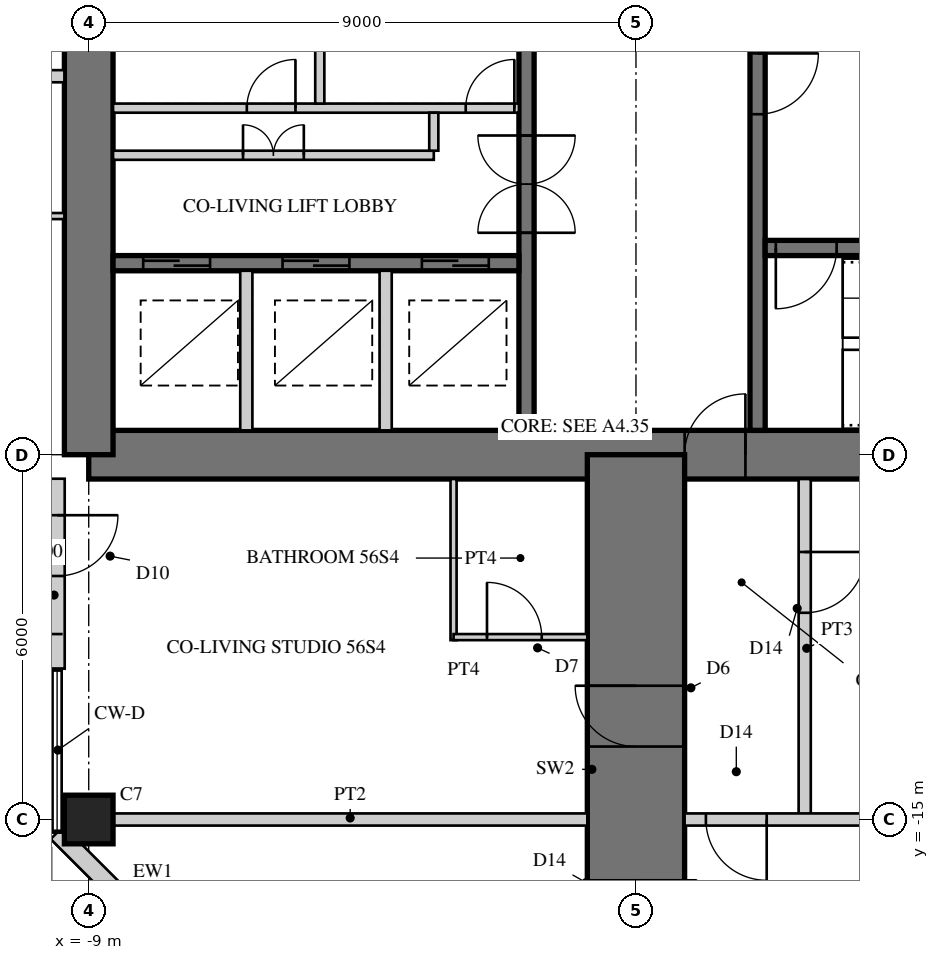
"""IFC4 building model, lengths in metres.
Left out: names, types, materials, properties, quantities, classifications, styles, units other than length and angle.
Written with IfcOpenShell. Run it as: python <this file> out.ifc"""

import sys

from ifc_helpers import new_model, si_unit, direction, frame, frame_2d, origin, origin_2d, place, context, subcontext, project, spatial, rectangle, hollow_rectangle, extrude, element, fill, save


model = new_model("IFC4")
c1 = context("Model", 3, precision=1e-05, world=origin(), true_north=direction((0.0, 1.0)))
c2 = subcontext(c1, "Body", "Model", "MODEL_VIEW")
j1 = project(units=[si_unit("LENGTHUNIT", "METRE"), si_unit("PLANEANGLEUNIT", "RADIAN")], contexts=[c1])
p1 = place(None, origin())
s1 = spatial("IfcSite", under=j1, at=p1, CompositionType="ELEMENT")
p2 = place(p1, origin())
s2 = spatial("IfcBuilding", under=s1, at=p2, CompositionType="ELEMENT")
p3 = place(p2, frame((0.0, 0.0, 222.1)))
s3 = spatial("IfcBuildingStorey", under=s2, at=p3, CompositionType="ELEMENT", Elevation=222.1)
p4 = place(p3, frame((-9.0, -9.0, 0.0), z_axis=(0.0, 0.0, 1.0), x_axis=(1.0, 0.0, 0.0)))
e1 = element("IfcWall", 1, at=p4, inside=s3, PredefinedType="SHEAR", context=c2, shape_type="SweptSolid", body=[
    extrude(rectangle(XDim=18.0, YDim=0.8, at=frame_2d((9.0, 0.0))), origin(), (0.0, 0.0, 1.0), 3.4),
])
p5 = place(p4, frame((9.8, 0.0, 0.0)))
e2 = element("IfcOpeningElement", 2, at=p5, cuts=e1, PredefinedType="OPENING", context=c2, shape_type="SweptSolid", body=[
    extrude(rectangle(XDim=1.0, YDim=2.4, at=frame_2d((0.5, 1.2))), frame((0.0, 0.41, 0.0), z_axis=(0.0, -1.0, 0.0), x_axis=(1.0, 0.0, 0.0)), (0.0, 0.0, 1.0), 0.82),
])
p6 = place(p3, frame((-9.0, 9.0, 0.0), z_axis=(0.0, 0.0, 1.0), x_axis=(0.0, -1.0, 0.0)))
e3 = element("IfcWall", 3, at=p6, inside=s3, PredefinedType="SHEAR", context=c2, shape_type="SweptSolid", body=[
    extrude(rectangle(XDim=18.0, YDim=0.8, at=frame_2d((9.0, 0.0))), origin(), (0.0, 0.0, 1.0), 3.4),
])
p7 = place(p6, frame((9.8, 0.0, 0.0)))
e4 = element("IfcOpeningElement", 4, at=p7, cuts=e3, PredefinedType="OPENING", context=c2, shape_type="SweptSolid", body=[
    extrude(rectangle(XDim=1.0, YDim=2.4, at=frame_2d((0.5, 1.2))), frame((0.0, 0.41, 0.0), z_axis=(0.0, -1.0, 0.0), x_axis=(1.0, 0.0, 0.0)), (0.0, 0.0, 1.0), 0.82),
])
p8 = place(p3, frame((-1.8, -1.875, 0.0), z_axis=(0.0, 0.0, 1.0), x_axis=(0.0, -1.0, 0.0)))
e5 = element("IfcWall", 5, at=p8, inside=s3, PredefinedType="SHEAR", context=c2, shape_type="SweptSolid", body=[
    extrude(rectangle(XDim=6.725, YDim=0.25, at=frame_2d((3.363, 0.0))), origin(), (0.0, 0.0, 1.0), 3.4),
])
p9 = place(p8, frame((1.875, 0.0, 0.0)))
e6 = element("IfcOpeningElement", 6, at=p9, cuts=e5, PredefinedType="OPENING", context=c2, shape_type="SweptSolid", body=[
    extrude(rectangle(XDim=1.6, YDim=2.4, at=frame_2d((0.8, 1.2))), frame((0.0, 0.135, 0.0), z_axis=(0.0, -1.0, 0.0), x_axis=(1.0, 0.0, 0.0)), (0.0, 0.0, 1.0), 0.27),
])
p10 = place(p3, frame((-1.925, -5.85, 0.0), z_axis=(0.0, 0.0, 1.0), x_axis=(-1.0, 0.0, 0.0)))
e7 = element("IfcWall", 7, at=p10, inside=s3, PredefinedType="SHEAR", context=c2, shape_type="SweptSolid", body=[
    extrude(rectangle(XDim=6.675, YDim=0.25, at=frame_2d((3.337, 0.0))), origin(), (0.0, 0.0, 1.0), 3.4),
])
p11 = place(p10, frame((0.496, 0.0, 0.0)))
e8 = element("IfcOpeningElement", 8, at=p11, cuts=e7, PredefinedType="OPENING", context=c2, shape_type="SweptSolid", body=[
    extrude(rectangle(XDim=1.1, YDim=2.2, at=frame_2d((0.55, 1.1))), frame((0.0, 0.135, 0.0), z_axis=(0.0, -1.0, 0.0), x_axis=(1.0, 0.0, 0.0)), (0.0, 0.0, 1.0), 0.27),
])
p12 = place(p10, frame((2.788, 0.0, 0.0)))
e9 = element("IfcOpeningElement", 9, at=p12, cuts=e7, PredefinedType="OPENING", context=c2, shape_type="SweptSolid", body=[
    extrude(rectangle(XDim=1.1, YDim=2.2, at=frame_2d((0.55, 1.1))), frame((0.0, 0.135, 0.0), z_axis=(0.0, -1.0, 0.0), x_axis=(1.0, 0.0, 0.0)), (0.0, 0.0, 1.0), 0.27),
])
p13 = place(p10, frame((5.079, 0.0, 0.0)))
e10 = element("IfcOpeningElement", 10, at=p13, cuts=e7, PredefinedType="OPENING", context=c2, shape_type="SweptSolid", body=[
    extrude(rectangle(XDim=1.1, YDim=2.2, at=frame_2d((0.55, 1.1))), frame((0.0, 0.135, 0.0), z_axis=(0.0, -1.0, 0.0), x_axis=(1.0, 0.0, 0.0)), (0.0, 0.0, 1.0), 0.27),
])
p14 = place(p3, frame((-1.925, -3.3, 0.0), z_axis=(0.0, 0.0, 1.0), x_axis=(-1.0, 0.0, 0.0)))
e11 = element("IfcWall", 11, at=p14, inside=s3, PredefinedType="PARTITIONING", context=c2, shape_type="SweptSolid", body=[
    extrude(rectangle(XDim=6.675, YDim=0.15, at=frame_2d((3.337, 0.0))), origin(), (0.0, 0.0, 1.0), 3.4),
])
p15 = place(p14, frame((0.075, 0.0, 0.0)))
e12 = element("IfcOpeningElement", 12, at=p15, cuts=e11, PredefinedType="OPENING", context=c2, shape_type="SweptSolid", body=[
    extrude(rectangle(XDim=0.8, YDim=2.1, at=frame_2d((0.4, 1.05))), frame((0.0, 0.085, 0.0), z_axis=(0.0, -1.0, 0.0), x_axis=(1.0, 0.0, 0.0)), (0.0, 0.0, 1.0), 0.17),
])
p16 = place(p14, frame((3.675, 0.0, 0.0)))
e13 = element("IfcOpeningElement", 13, at=p16, cuts=e11, PredefinedType="OPENING", context=c2, shape_type="SweptSolid", body=[
    extrude(rectangle(XDim=0.8, YDim=2.1, at=frame_2d((0.4, 1.05))), frame((0.0, 0.085, 0.0), z_axis=(0.0, -1.0, 0.0), x_axis=(1.0, 0.0, 0.0)), (0.0, 0.0, 1.0), 0.17),
])
p17 = place(p3, frame((-5.2, -2.125, 0.0), z_axis=(0.0, 0.0, 1.0), x_axis=(0.0, -1.0, 0.0)))
e14 = element("IfcWall", 14, at=p17, inside=s3, PredefinedType="PARTITIONING", context=c2, shape_type="SweptSolid", body=[
    extrude(rectangle(XDim=1.1, YDim=0.15, at=frame_2d((0.55, 0.0))), origin(), (0.0, 0.0, 1.0), 3.4),
])
for number, where, z_axis, x_axis in (
    (15, (-4.117, -5.975, 0.0), (0.0, 0.0, 1.0), (0.0, -1.0, 0.0)),
    (16, (-6.408, -5.975, 0.0), (0.0, 0.0, 1.0), (0.0, -1.0, 0.0)),
):
    element("IfcWall", number, at=place(p3, frame(where, z_axis=z_axis, x_axis=x_axis)), inside=s3, PredefinedType="PARTITIONING", context=c2, shape_type="SweptSolid", body=[
        extrude(rectangle(XDim=2.625, YDim=0.2, at=frame_2d((1.312, 0.0))), origin(), (0.0, 0.0, 1.0), 3.4),
    ])
p18 = place(p3, frame((2.0, -1.675, 0.0), z_axis=(0.0, 0.0, 1.0), x_axis=(0.0, -1.0, 0.0)))
e17 = element("IfcWall", 17, at=p18, inside=s3, PredefinedType="SHEAR", context=c2, shape_type="SweptSolid", body=[
    extrude(rectangle(XDim=6.925, YDim=0.25, at=frame_2d((3.462, 0.0))), origin(), (0.0, 0.0, 1.0), 3.4),
])
p19 = place(p18, frame((0.725, 0.0, 0.0)))
e18 = element("IfcOpeningElement", 18, at=p19, cuts=e17, PredefinedType="OPENING", context=c2, shape_type="SweptSolid", body=[
    extrude(rectangle(XDim=1.0, YDim=2.1, at=frame_2d((0.5, 1.05))), frame((0.0, 0.135, 0.0), z_axis=(0.0, -1.0, 0.0), x_axis=(1.0, 0.0, 0.0)), (0.0, 0.0, 1.0), 0.27),
])
p20 = place(p3, frame((2.125, -5.6, 0.0), z_axis=(0.0, 0.0, 1.0), x_axis=(1.0, 0.0, 0.0)))
e19 = element("IfcWall", 19, at=p20, inside=s3, PredefinedType="SHEAR", context=c2, shape_type="SweptSolid", body=[
    extrude(rectangle(XDim=6.475, YDim=0.25, at=frame_2d((3.238, 0.0))), origin(), (0.0, 0.0, 1.0), 3.4),
])
p21 = place(p20, frame((0.175, 0.0, 0.0)))
e20 = element("IfcOpeningElement", 20, at=p21, cuts=e19, PredefinedType="OPENING", context=c2, shape_type="SweptSolid", body=[
    extrude(rectangle(XDim=1.0, YDim=2.1, at=frame_2d((0.5, 1.05))), frame((0.0, 0.135, 0.0), z_axis=(0.0, -1.0, 0.0), x_axis=(1.0, 0.0, 0.0)), (0.0, 0.0, 1.0), 0.27),
])
p22 = place(p3, frame((0.0, -9.0, 0.0), z_axis=(0.0, 0.0, 1.0), x_axis=(0.0, -1.0, 0.0)))
e21 = element("IfcWall", 21, at=p22, inside=s3, PredefinedType="SHEAR", context=c2, shape_type="SweptSolid", body=[
    extrude(rectangle(XDim=9.0, YDim=1.6, at=frame_2d((4.5, 0.0))), origin(), (0.0, 0.0, 1.0), 3.4),
])
p23 = place(p22, frame((3.8, 0.0, 0.0)))
e22 = element("IfcOpeningElement", 22, at=p23, cuts=e21, PredefinedType="OPENING", context=c2, shape_type="SweptSolid", body=[
    extrude(rectangle(XDim=1.0, YDim=2.15, at=frame_2d((0.5, 1.075))), frame((0.0, 0.81, 0.0), z_axis=(0.0, -1.0, 0.0), x_axis=(1.0, 0.0, 0.0)), (0.0, 0.0, 1.0), 1.62),
])
p24 = place(p22, frame((7.0, 0.0, 0.0)))
e23 = element("IfcOpeningElement", 23, at=p24, cuts=e21, PredefinedType="OPENING", context=c2, shape_type="SweptSolid", body=[
    extrude(rectangle(XDim=1.0, YDim=2.2, at=frame_2d((0.5, 1.1))), frame((0.0, 0.81, 0.0), z_axis=(0.0, -1.0, 0.0), x_axis=(1.0, 0.0, 0.0)), (0.0, 0.0, 1.0), 1.62),
])
p25 = place(p3, frame((-9.0, -15.0, 0.0), z_axis=(0.0, 0.0, 1.0), x_axis=(1.0, 0.0, 0.0)))
e24 = element("IfcColumn", 24, at=p25, inside=s3, PredefinedType="COLUMN", context=c2, shape_type="SweptSolid", body=[
    extrude(rectangle(XDim=0.8, YDim=0.8, at=origin_2d()), origin(), (0.0, 0.0, 1.0), 3.4),
])
p26 = place(p3, frame((-9.52, -9.395, 0.0), z_axis=(0.0, 0.0, 1.0), x_axis=(0.0, -1.0, 0.0)))
e25 = element("IfcWall", 25, at=p26, inside=s3, PredefinedType="SOLIDWALL", context=c2, shape_type="SweptSolid", body=[
    extrude(rectangle(XDim=3.125, YDim=0.25, at=frame_2d((1.562, 0.0))), origin(), (0.0, 0.0, 1.0), 3.22),
])
p27 = place(p26, frame((0.6, 0.0, 0.0)))
e26 = element("IfcOpeningElement", 26, at=p27, cuts=e25, PredefinedType="OPENING", context=c2, shape_type="SweptSolid", body=[
    extrude(rectangle(XDim=1.0, YDim=2.2, at=frame_2d((0.5, 1.1))), frame((0.0, 0.135, 0.0), z_axis=(0.0, -1.0, 0.0), x_axis=(1.0, 0.0, 0.0)), (0.0, 0.0, 1.0), 0.27),
])
p28 = place(p3, frame((-9.52, -15.215, 0.0), z_axis=(0.0, 0.0, 1.0), x_axis=(0.707106781187, -0.707106781187, 0.0)))
e27 = element("IfcWall", 27, at=p28, inside=s3, PredefinedType="SOLIDWALL", context=c2, shape_type="SweptSolid", body=[
    extrude(rectangle(XDim=4.674, YDim=0.3, at=frame_2d((2.337, 0.0))), origin(), (0.0, 0.0, 1.0), 3.22),
])
p29 = place(p28, frame((2.15, 0.0, 0.0)))
e28 = element("IfcOpeningElement", 28, at=p29, cuts=e27, PredefinedType="OPENING", context=c2, shape_type="SweptSolid", body=[
    extrude(rectangle(XDim=1.0, YDim=2.4, at=frame_2d((0.5, 1.2))), frame((0.0, 0.16, 0.0), z_axis=(0.0, -1.0, 0.0), x_axis=(1.0, 0.0, 0.0)), (0.0, 0.0, 1.0), 0.32),
])
p30 = place(p3, frame((-3.325, -4.075, 0.0), z_axis=(0.0, 0.0, 1.0), x_axis=(-1.0, 0.0, 0.0)))
e29 = element("IfcWall", 29, at=p30, inside=s3, PredefinedType="PARTITIONING", context=c2, shape_type="SweptSolid", body=[
    extrude(rectangle(XDim=5.275, YDim=0.15, at=frame_2d((2.638, 0.0))), origin(), (0.0, 0.0, 1.0), 3.22),
])
p31 = place(p30, frame((2.137, 0.0, 0.0)))
e30 = element("IfcOpeningElement", 30, at=p31, cuts=e29, PredefinedType="OPENING", context=c2, shape_type="SweptSolid", body=[
    extrude(rectangle(XDim=1.0, YDim=2.1, at=frame_2d((0.5, 1.05))), frame((0.0, 0.085, 0.0), z_axis=(0.0, -1.0, 0.0), x_axis=(1.0, 0.0, 0.0)), (0.0, 0.0, 1.0), 0.17),
])
p32 = place(p3, frame((-3.325, -3.375, 0.0), z_axis=(0.0, 0.0, 1.0), x_axis=(0.0, -1.0, 0.0)))
e31 = element("IfcWall", 31, at=p32, inside=s3, PredefinedType="PARTITIONING", context=c2, shape_type="SweptSolid", body=[
    extrude(rectangle(XDim=0.625, YDim=0.15, at=frame_2d((0.312, 0.0))), origin(), (0.0, 0.0, 1.0), 3.22),
])
p33 = place(p3, frame((-3.0, -9.4, 0.0), z_axis=(0.0, 0.0, 1.0), x_axis=(0.0, -1.0, 0.0)))
e32 = element("IfcWall", 32, at=p33, inside=s3, PredefinedType="PARTITIONING", context=c2, shape_type="SweptSolid", body=[
    extrude(rectangle(XDim=2.65, YDim=0.1, at=frame_2d((1.325, 0.0))), origin(), (0.0, 0.0, 1.0), 3.22),
])
p34 = place(p3, frame((-3.0, -12.0, 0.0), z_axis=(0.0, 0.0, 1.0), x_axis=(1.0, 0.0, 0.0)))
e33 = element("IfcWall", 33, at=p34, inside=s3, PredefinedType="PARTITIONING", context=c2, shape_type="SweptSolid", body=[
    extrude(rectangle(XDim=2.2, YDim=0.1, at=frame_2d((1.1, 0.0))), origin(), (0.0, 0.0, 1.0), 3.22),
])
p35 = place(p34, frame((0.55, 0.0, 0.0)))
e34 = element("IfcOpeningElement", 34, at=p35, cuts=e33, PredefinedType="OPENING", context=c2, shape_type="SweptSolid", body=[
    extrude(rectangle(XDim=0.9, YDim=2.1, at=frame_2d((0.45, 1.05))), frame((0.0, 0.06, 0.0), z_axis=(0.0, -1.0, 0.0), x_axis=(1.0, 0.0, 0.0)), (0.0, 0.0, 1.0), 0.12),
])
p36 = place(p3, frame((2.775, -9.4, 0.0), z_axis=(0.0, 0.0, 1.0), x_axis=(0.0, -1.0, 0.0)))
e35 = element("IfcWall", 35, at=p36, inside=s3, PredefinedType="SOLIDWALL", context=c2, shape_type="SweptSolid", body=[
    extrude(rectangle(XDim=5.6, YDim=0.2, at=frame_2d((2.8, 0.0))), origin(), (0.0, 0.0, 1.0), 3.22),
])
p37 = place(p36, frame((1.2, 0.0, 0.0)))
e36 = element("IfcOpeningElement", 36, at=p37, cuts=e35, PredefinedType="OPENING", context=c2, shape_type="SweptSolid", body=[
    extrude(rectangle(XDim=1.0, YDim=2.2, at=frame_2d((0.5, 1.1))), frame((0.0, 0.11, 0.0), z_axis=(0.0, -1.0, 0.0), x_axis=(1.0, 0.0, 0.0)), (0.0, 0.0, 1.0), 0.22),
])
p38 = place(p3, frame((-8.6, -15.0, 0.0), z_axis=(0.0, 0.0, 1.0), x_axis=(1.0, 0.0, 0.0)))
e37 = element("IfcWall", 37, at=p38, inside=s3, PredefinedType="SOLIDWALL", context=c2, shape_type="SweptSolid", body=[
    extrude(rectangle(XDim=7.8, YDim=0.2, at=frame_2d((3.9, 0.0))), origin(), (0.0, 0.0, 1.0), 2.52),
])
p39 = place(p3, frame((0.8, -15.0, 0.0), z_axis=(0.0, 0.0, 1.0), x_axis=(1.0, 0.0, 0.0)))
e38 = element("IfcWall", 38, at=p39, inside=s3, PredefinedType="SOLIDWALL", context=c2, shape_type="SweptSolid", body=[
    extrude(rectangle(XDim=7.8, YDim=0.2, at=frame_2d((3.9, 0.0))), origin(), (0.0, 0.0, 1.0), 2.52),
])
p40 = place(p39, frame((0.35, 0.0, 0.0)))
e39 = element("IfcOpeningElement", 39, at=p40, cuts=e38, PredefinedType="OPENING", context=c2, shape_type="SweptSolid", body=[
    extrude(rectangle(XDim=1.0, YDim=2.2, at=frame_2d((0.5, 1.1))), frame((0.0, 0.11, 0.0), z_axis=(0.0, -1.0, 0.0), x_axis=(1.0, 0.0, 0.0)), (0.0, 0.0, 1.0), 0.22),
])
p41 = place(p3, frame((-9.4, -5.075, 0.0), z_axis=(0.0, 0.0, 1.0), x_axis=(-1.0, 0.0, 0.0)))
e40 = element("IfcWall", 40, at=p41, inside=s3, PredefinedType="PARTITIONING", context=c2, shape_type="SweptSolid", body=[
    extrude(rectangle(XDim=2.65, YDim=0.1, at=frame_2d((1.325, 0.0))), origin(), (0.0, 0.0, 1.0), 3.22),
])
p42 = place(p3, frame((-9.4, -2.775, 0.0), z_axis=(0.0, 0.0, 1.0), x_axis=(-1.0, 0.0, 0.0)))
e41 = element("IfcWall", 41, at=p42, inside=s3, PredefinedType="SOLIDWALL", context=c2, shape_type="SweptSolid", body=[
    extrude(rectangle(XDim=11.6, YDim=0.2, at=frame_2d((5.8, 0.0))), origin(), (0.0, 0.0, 1.0), 3.22),
])
p43 = place(p42, frame((3.4, 0.0, 0.0)))
e42 = element("IfcOpeningElement", 42, at=p43, cuts=e41, PredefinedType="OPENING", context=c2, shape_type="SweptSolid", body=[
    extrude(rectangle(XDim=1.0, YDim=2.15, at=frame_2d((0.5, 1.075))), frame((0.0, 0.11, 0.0), z_axis=(0.0, -1.0, 0.0), x_axis=(1.0, 0.0, 0.0)), (0.0, 0.0, 1.0), 0.22),
])
p44 = place(p42, frame((6.2, 0.0, 0.0)))
e43 = element("IfcOpeningElement", 43, at=p44, cuts=e41, PredefinedType="OPENING", context=c2, shape_type="SweptSolid", body=[
    extrude(rectangle(XDim=1.0, YDim=2.15, at=frame_2d((0.5, 1.075))), frame((0.0, 0.11, 0.0), z_axis=(0.0, -1.0, 0.0), x_axis=(1.0, 0.0, 0.0)), (0.0, 0.0, 1.0), 0.22),
])
p45 = place(p27, origin())
e44 = element("IfcDoor", 44, at=p45, inside=s3, OperationType="SINGLE_SWING_LEFT", PredefinedType="DOOR", context=c2, shape_type="SweptSolid", body=[
    extrude(hollow_rectangle(XDim=1.0, YDim=2.2, WallThickness=0.06, at=frame_2d((0.5, 1.1))), frame((0.0, 0.025, 0.0), z_axis=(0.0, -1.0, 0.0), x_axis=(1.0, 0.0, 0.0)), (0.0, 0.0, 1.0), 0.05),
    extrude(rectangle(XDim=0.879, YDim=2.079, at=frame_2d((0.5, 1.1))), frame((0.0, 0.025, 0.0), z_axis=(0.0, -1.0, 0.0), x_axis=(1.0, 0.0, 0.0)), (0.0, 0.0, 1.0), 0.05),
])
fill(e26, e44)
p46 = place(p31, frame((1.0, 0.0, 0.0), z_axis=(0.0, 0.0, 1.0), x_axis=(-1.0, 0.0, 0.0)))
e45 = element("IfcDoor", 45, at=p46, inside=s3, OperationType="DOUBLE_DOOR_SINGLE_SWING", PredefinedType="DOOR", context=c2, shape_type="SweptSolid", body=[
    extrude(rectangle(XDim=1.0, YDim=2.1, at=frame_2d((0.5, 1.05))), frame((0.0, 0.025, 0.0), z_axis=(0.0, -1.0, 0.0), x_axis=(1.0, 0.0, 0.0)), (0.0, 0.0, 1.0), 0.05),
])
fill(e30, e45)
p47 = place(p35, origin())
e46 = element("IfcDoor", 46, at=p47, inside=s3, OperationType="SINGLE_SWING_LEFT", PredefinedType="DOOR", context=c2, shape_type="SweptSolid", body=[
    extrude(rectangle(XDim=0.9, YDim=2.1, at=frame_2d((0.45, 1.05))), frame((0.0, 0.025, 0.0), z_axis=(0.0, -1.0, 0.0), x_axis=(1.0, 0.0, 0.0)), (0.0, 0.0, 1.0), 0.05),
])
fill(e34, e46)
p48 = place(p37, origin())
e47 = element("IfcDoor", 47, at=p48, inside=s3, OperationType="SINGLE_SWING_LEFT", PredefinedType="DOOR", context=c2, shape_type="SweptSolid", body=[
    extrude(rectangle(XDim=1.0, YDim=2.2, at=frame_2d((0.5, 1.1))), frame((0.0, 0.025, 0.0), z_axis=(0.0, -1.0, 0.0), x_axis=(1.0, 0.0, 0.0)), (0.0, 0.0, 1.0), 0.05),
])
fill(e36, e47)
p49 = place(p40, frame((1.0, 0.0, 0.0), z_axis=(0.0, 0.0, 1.0), x_axis=(-1.0, 0.0, 0.0)))
e48 = element("IfcDoor", 48, at=p49, inside=s3, OperationType="SINGLE_SWING_LEFT", PredefinedType="DOOR", context=c2, shape_type="SweptSolid", body=[
    extrude(rectangle(XDim=1.0, YDim=2.2, at=frame_2d((0.5, 1.1))), frame((0.0, 0.025, 0.0), z_axis=(0.0, -1.0, 0.0), x_axis=(1.0, 0.0, 0.0)), (0.0, 0.0, 1.0), 0.05),
])
fill(e39, e48)
p50 = place(p23, frame((1.0, 0.0, 0.0), z_axis=(0.0, 0.0, 1.0), x_axis=(-1.0, 0.0, 0.0)))
e49 = element("IfcDoor", 49, at=p50, inside=s3, OperationType="SINGLE_SWING_RIGHT", PredefinedType="DOOR", context=c2, shape_type="SweptSolid", body=[
    extrude(rectangle(XDim=1.0, YDim=2.15, at=frame_2d((0.5, 1.075))), frame((0.0, 0.025, 0.0), z_axis=(0.0, -1.0, 0.0), x_axis=(1.0, 0.0, 0.0)), (0.0, 0.0, 1.0), 0.05),
])
fill(e22, e49)
p51 = place(p5, origin())
e50 = element("IfcDoor", 50, at=p51, inside=s3, OperationType="SINGLE_SWING_RIGHT", PredefinedType="DOOR", context=c2, shape_type="SweptSolid", body=[
    extrude(rectangle(XDim=1.0, YDim=2.4, at=frame_2d((0.5, 1.2))), frame((0.0, 0.055, 0.0), z_axis=(0.0, -1.0, 0.0), x_axis=(1.0, 0.0, 0.0)), (0.0, 0.0, 1.0), 0.05),
])
fill(e2, e50)
p52 = place(p11, origin())
e51 = element("IfcDoor", 51, at=p52, inside=s3, OperationType="DOUBLE_DOOR_SLIDING", PredefinedType="DOOR", context=c2, shape_type="SweptSolid", body=[
    extrude(rectangle(XDim=1.1, YDim=2.2, at=frame_2d((0.55, 1.1))), frame((0.0, 0.025, 0.0), z_axis=(0.0, -1.0, 0.0), x_axis=(1.0, 0.0, 0.0)), (0.0, 0.0, 1.0), 0.05),
])
fill(e8, e51)
p53 = place(p12, origin())
e52 = element("IfcDoor", 52, at=p53, inside=s3, OperationType="DOUBLE_DOOR_SLIDING", PredefinedType="DOOR", context=c2, shape_type="SweptSolid", body=[
    extrude(rectangle(XDim=1.1, YDim=2.2, at=frame_2d((0.55, 1.1))), frame((0.0, 0.025, 0.0), z_axis=(0.0, -1.0, 0.0), x_axis=(1.0, 0.0, 0.0)), (0.0, 0.0, 1.0), 0.05),
])
fill(e9, e52)
p54 = place(p13, origin())
e53 = element("IfcDoor", 53, at=p54, inside=s3, OperationType="DOUBLE_DOOR_SLIDING", PredefinedType="DOOR", context=c2, shape_type="SweptSolid", body=[
    extrude(rectangle(XDim=1.1, YDim=2.2, at=frame_2d((0.55, 1.1))), frame((0.0, 0.025, 0.0), z_axis=(0.0, -1.0, 0.0), x_axis=(1.0, 0.0, 0.0)), (0.0, 0.0, 1.0), 0.05),
])
fill(e10, e53)
p55 = place(p9, origin())
e54 = element("IfcDoor", 54, at=p55, inside=s3, OperationType="DOUBLE_DOOR_DOUBLE_SWING", PredefinedType="DOOR", context=c2, shape_type="SweptSolid", body=[
    extrude(rectangle(XDim=1.6, YDim=2.4, at=frame_2d((0.8, 1.2))), frame((0.0, 0.025, 0.0), z_axis=(0.0, -1.0, 0.0), x_axis=(1.0, 0.0, 0.0)), (0.0, 0.0, 1.0), 0.05),
])
fill(e6, e54)
p56 = place(p15, frame((0.8, 0.0, 0.0), z_axis=(0.0, 0.0, 1.0), x_axis=(-1.0, 0.0, 0.0)))
e55 = element("IfcDoor", 55, at=p56, inside=s3, OperationType="SINGLE_SWING_RIGHT", PredefinedType="DOOR", context=c2, shape_type="SweptSolid", body=[
    extrude(rectangle(XDim=0.8, YDim=2.1, at=frame_2d((0.4, 1.05))), frame((0.0, 0.025, 0.0), z_axis=(0.0, -1.0, 0.0), x_axis=(1.0, 0.0, 0.0)), (0.0, 0.0, 1.0), 0.05),
])
fill(e12, e55)
p57 = place(p16, frame((0.8, 0.0, 0.0), z_axis=(0.0, 0.0, 1.0), x_axis=(-1.0, 0.0, 0.0)))
e56 = element("IfcDoor", 56, at=p57, inside=s3, OperationType="SINGLE_SWING_RIGHT", PredefinedType="DOOR", context=c2, shape_type="SweptSolid", body=[
    extrude(rectangle(XDim=0.8, YDim=2.1, at=frame_2d((0.4, 1.05))), frame((0.0, 0.025, 0.0), z_axis=(0.0, -1.0, 0.0), x_axis=(1.0, 0.0, 0.0)), (0.0, 0.0, 1.0), 0.05),
])
fill(e13, e56)
p58 = place(p19, origin())
e57 = element("IfcDoor", 57, at=p58, inside=s3, OperationType="SINGLE_SWING_LEFT", PredefinedType="DOOR", context=c2, shape_type="SweptSolid", body=[
    extrude(rectangle(XDim=1.0, YDim=2.1, at=frame_2d((0.5, 1.05))), frame((0.0, 0.025, 0.0), z_axis=(0.0, -1.0, 0.0), x_axis=(1.0, 0.0, 0.0)), (0.0, 0.0, 1.0), 0.05),
])
fill(e18, e57)
p59 = place(p21, frame((1.0, 0.0, 0.0), z_axis=(0.0, 0.0, 1.0), x_axis=(-1.0, 0.0, 0.0)))
e58 = element("IfcDoor", 58, at=p59, inside=s3, OperationType="SINGLE_SWING_RIGHT", PredefinedType="DOOR", context=c2, shape_type="SweptSolid", body=[
    extrude(rectangle(XDim=1.0, YDim=2.1, at=frame_2d((0.5, 1.05))), frame((0.0, 0.025, 0.0), z_axis=(0.0, -1.0, 0.0), x_axis=(1.0, 0.0, 0.0)), (0.0, 0.0, 1.0), 0.05),
])
fill(e20, e58)
save(model, sys.argv[1])
